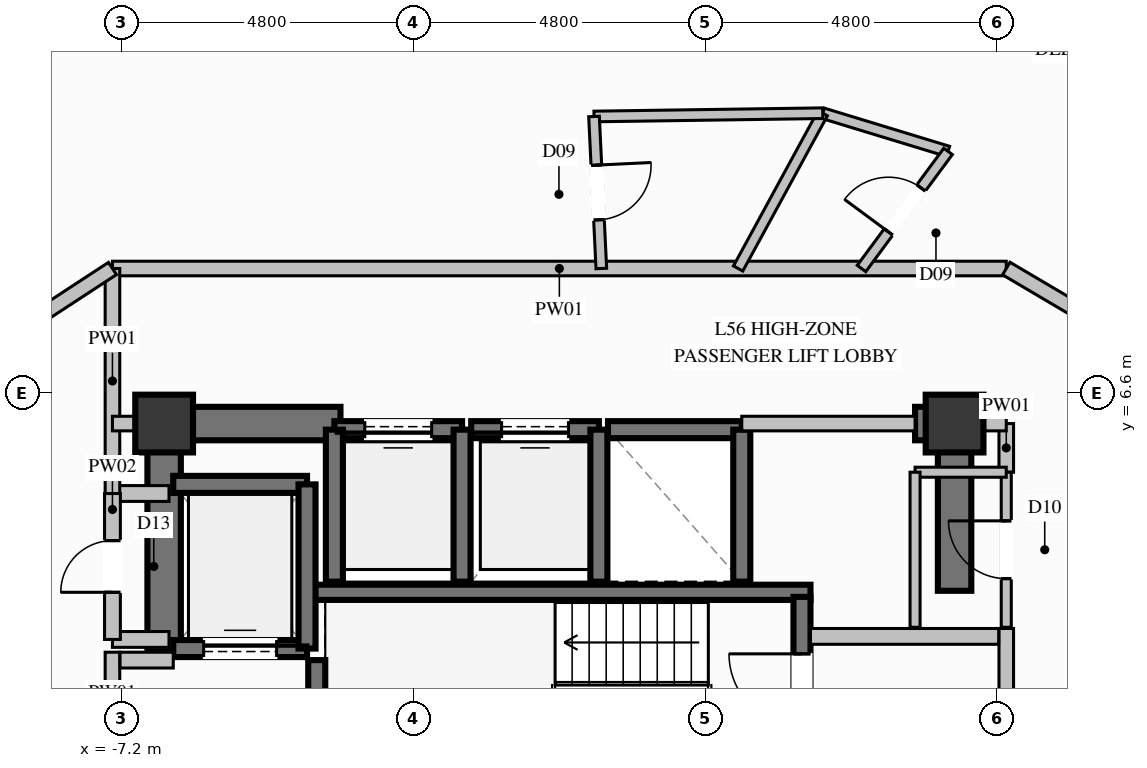
"""IFC4 building model, lengths in metres.
Left out: names, types, materials, properties, quantities, classifications, styles, units other than length and angle.
Written with IfcOpenShell. Run it as: python <this file> out.ifc"""

import sys

from ifc_helpers import new_model, si_unit, direction, frame, frame_2d, origin, origin_2d, place, context, subcontext, project, spatial, rectangle, extrude, element, fill, save


model = new_model("IFC4")
c1 = context("Model", 3, precision=1e-05, world=origin(), true_north=direction((0.0, 1.0)))
c2 = subcontext(c1, "Body", "Model", "MODEL_VIEW")
j1 = project(units=[si_unit("LENGTHUNIT", "METRE"), si_unit("PLANEANGLEUNIT", "RADIAN")], contexts=[c1])
p1 = place(None, origin())
s1 = spatial("IfcSite", under=j1, at=p1, CompositionType="ELEMENT")
p2 = place(p1, origin())
s2 = spatial("IfcBuilding", under=s1, at=p2, CompositionType="ELEMENT")
p3 = place(p2, frame((0.0, 0.0, 216.4)))
s3 = spatial("IfcBuildingStorey", under=s2, at=p3, CompositionType="ELEMENT", Elevation=216.4)
for number, where, z_axis, x_axis in (
    (1, (6.5, 6.1, 0.0), (0.0, 0.0, 1.0), (1.0, 0.0, 0.0)),
    (2, (-6.5, 6.1, 0.0), (0.0, 0.0, 1.0), (1.0, 0.0, 0.0)),
):
    element("IfcColumn", number, at=place(p3, frame(where, z_axis=z_axis, x_axis=x_axis)), inside=s3, PredefinedType="COLUMN", context=c2, shape_type="SweptSolid", body=[
        extrude(rectangle(XDim=0.95, YDim=0.95, at=origin_2d()), origin(), (0.0, 0.0, 1.0), 3.6),
    ])
p4 = place(p3, frame((-4.13, 3.325, 0.0), z_axis=(0.0, 0.0, 1.0), x_axis=(1.0, 0.0, 0.0)))
e3 = element("IfcWall", 3, at=p4, inside=s3, PredefinedType="SOLIDWALL", context=c2, shape_type="SweptSolid", body=[
    extrude(rectangle(XDim=8.26, YDim=0.25, at=frame_2d((4.13, 0.0))), origin(), (0.0, 0.0, 1.0), 3.6),
])
p5 = place(p3, frame((-6.225, 6.1, 0.0), z_axis=(0.0, 0.0, 1.0), x_axis=(1.0, 0.0, 0.0)))
e4 = element("IfcWall", 4, at=p5, inside=s3, PredefinedType="SHEAR", context=c2, shape_type="SweptSolid", body=[
    extrude(rectangle(XDim=2.625, YDim=0.55, at=frame_2d((1.312, 0.0))), origin(), (0.0, 0.0, 1.0), 3.6),
])
p6 = place(p3, frame((5.85, 6.1, 0.0), z_axis=(0.0, 0.0, 1.0), x_axis=(1.0, 0.0, 0.0)))
e5 = element("IfcWall", 5, at=p6, inside=s3, PredefinedType="SHEAR", context=c2, shape_type="SweptSolid", body=[
    extrude(rectangle(XDim=0.375, YDim=0.55, at=frame_2d((0.188, 0.0))), origin(), (0.0, 0.0, 1.0), 3.6),
])
p7 = place(p3, frame((-6.5, 2.35, 0.0), z_axis=(0.0, 0.0, 1.0), x_axis=(0.0, 1.0, 0.0)))
e6 = element("IfcWall", 6, at=p7, inside=s3, PredefinedType="SHEAR", context=c2, shape_type="SweptSolid", body=[
    extrude(rectangle(XDim=4.025, YDim=0.55, at=frame_2d((2.012, 0.0))), origin(), (0.0, 0.0, 1.0), 3.6),
])
p8 = place(p3, frame((6.5, 3.35, 0.0), z_axis=(0.0, 0.0, 1.0), x_axis=(0.0, 1.0, 0.0)))
e7 = element("IfcWall", 7, at=p8, inside=s3, PredefinedType="SHEAR", context=c2, shape_type="SweptSolid", body=[
    extrude(rectangle(XDim=3.025, YDim=0.55, at=frame_2d((1.512, 0.0))), origin(), (0.0, 0.0, 1.0), 3.6),
])
p9 = place(p3, frame((-1.6, 6.0, 0.0), z_axis=(0.0, 0.0, 1.0), x_axis=(-1.0, 0.0, 0.0)))
e8 = element("IfcWall", 8, at=p9, inside=s3, PredefinedType="SOLIDWALL", context=c2, shape_type="SweptSolid", body=[
    extrude(rectangle(XDim=2.1, YDim=0.28, at=frame_2d((1.05, 0.0))), origin(), (0.0, 0.0, 1.0), 3.36),
])
p10 = place(p9, frame((0.5, 0.0, 0.0)))
e9 = element("IfcOpeningElement", 9, at=p10, cuts=e8, PredefinedType="OPENING", context=c2, shape_type="SweptSolid", body=[
    extrude(rectangle(XDim=1.1, YDim=2.2, at=frame_2d((0.55, 1.1))), frame((0.0, 0.15, 0.0), z_axis=(0.0, -1.0, 0.0), x_axis=(1.0, 0.0, 0.0)), (0.0, 0.0, 1.0), 0.3),
])
for number, where, z_axis, x_axis in (
    (10, (-3.7, 6.0, 0.0), (0.0, 0.0, 1.0), (0.0, -1.0, 0.0)),
    (11, (-1.6, 3.5, 0.0), (0.0, 0.0, 1.0), (0.0, 1.0, 0.0)),
):
    element("IfcWall", number, at=place(p3, frame(where, z_axis=z_axis, x_axis=x_axis)), inside=s3, PredefinedType="SOLIDWALL", context=c2, shape_type="SweptSolid", body=[
        extrude(rectangle(XDim=2.5, YDim=0.28, at=frame_2d((1.25, 0.0))), origin(), (0.0, 0.0, 1.0), 3.36),
    ])
p11 = place(p3, frame((0.65, 6.0, 0.0), z_axis=(0.0, 0.0, 1.0), x_axis=(-1.0, 0.0, 0.0)))
e12 = element("IfcWall", 12, at=p11, inside=s3, PredefinedType="SOLIDWALL", context=c2, shape_type="SweptSolid", body=[
    extrude(rectangle(XDim=2.1, YDim=0.28, at=frame_2d((1.05, 0.0))), origin(), (0.0, 0.0, 1.0), 3.36),
])
p12 = place(p11, frame((0.5, 0.0, 0.0)))
e13 = element("IfcOpeningElement", 13, at=p12, cuts=e12, PredefinedType="OPENING", context=c2, shape_type="SweptSolid", body=[
    extrude(rectangle(XDim=1.1, YDim=2.2, at=frame_2d((0.55, 1.1))), frame((0.0, 0.15, 0.0), z_axis=(0.0, -1.0, 0.0), x_axis=(1.0, 0.0, 0.0)), (0.0, 0.0, 1.0), 0.3),
])
p13 = place(p3, frame((0.65, 3.5, 0.0), z_axis=(0.0, 0.0, 1.0), x_axis=(0.0, 1.0, 0.0)))
e14 = element("IfcWall", 14, at=p13, inside=s3, PredefinedType="SOLIDWALL", context=c2, shape_type="SweptSolid", body=[
    extrude(rectangle(XDim=2.5, YDim=0.28, at=frame_2d((1.25, 0.0))), origin(), (0.0, 0.0, 1.0), 3.36),
])
p14 = place(p3, frame((3.0, 6.0, 0.0), z_axis=(0.0, 0.0, 1.0), x_axis=(-1.0, 0.0, 0.0)))
e15 = element("IfcWall", 15, at=p14, inside=s3, PredefinedType="SOLIDWALL", context=c2, shape_type="SweptSolid", body=[
    extrude(rectangle(XDim=2.2, YDim=0.28, at=frame_2d((1.1, 0.0))), origin(), (0.0, 0.0, 1.0), 3.36),
])
p15 = place(p3, frame((3.0, 3.5, 0.0), z_axis=(0.0, 0.0, 1.0), x_axis=(0.0, 1.0, 0.0)))
e16 = element("IfcWall", 16, at=p15, inside=s3, PredefinedType="SOLIDWALL", context=c2, shape_type="SweptSolid", body=[
    extrude(rectangle(XDim=2.5, YDim=0.28, at=frame_2d((1.25, 0.0))), origin(), (0.0, 0.0, 1.0), 3.36),
])
p16 = place(p3, frame((-6.35, 2.4, 0.0), z_axis=(0.0, 0.0, 1.0), x_axis=(1.0, 0.0, 0.0)))
e17 = element("IfcWall", 17, at=p16, inside=s3, PredefinedType="SOLIDWALL", context=c2, shape_type="SweptSolid", body=[
    extrude(rectangle(XDim=2.2, YDim=0.28, at=frame_2d((1.1, 0.0))), origin(), (0.0, 0.0, 1.0), 3.36),
])
p17 = place(p16, frame((0.5, 0.0, 0.0)))
e18 = element("IfcOpeningElement", 18, at=p17, cuts=e17, PredefinedType="OPENING", context=c2, shape_type="SweptSolid", body=[
    extrude(rectangle(XDim=1.2, YDim=2.2, at=frame_2d((0.6, 1.1))), frame((0.0, 0.15, 0.0), z_axis=(0.0, -1.0, 0.0), x_axis=(1.0, 0.0, 0.0)), (0.0, 0.0, 1.0), 0.3),
])
p18 = place(p3, frame((-4.15, 5.1, 0.0), z_axis=(0.0, 0.0, 1.0), x_axis=(-1.0, 0.0, 0.0)))
e19 = element("IfcWall", 19, at=p18, inside=s3, PredefinedType="SOLIDWALL", context=c2, shape_type="SweptSolid", body=[
    extrude(rectangle(XDim=2.2, YDim=0.28, at=frame_2d((1.1, 0.0))), origin(), (0.0, 0.0, 1.0), 3.36),
])
p19 = place(p3, frame((-4.15, 2.4, 0.0), z_axis=(0.0, 0.0, 1.0), x_axis=(0.0, 1.0, 0.0)))
e20 = element("IfcWall", 20, at=p19, inside=s3, PredefinedType="SOLIDWALL", context=c2, shape_type="SweptSolid", body=[
    extrude(rectangle(XDim=2.7, YDim=0.28, at=frame_2d((1.35, 0.0))), origin(), (0.0, 0.0, 1.0), 3.36),
])
p20 = place(p3, frame((-3.99, -3.25, 0.0), z_axis=(0.0, 0.0, 1.0), x_axis=(0.0, 1.0, 0.0)))
e21 = element("IfcWall", 21, at=p20, inside=s3, PredefinedType="SOLIDWALL", context=c2, shape_type="SweptSolid", body=[
    extrude(rectangle(XDim=5.46, YDim=0.28, at=frame_2d((2.73, 0.0))), origin(), (0.0, 0.0, 1.0), 3.36),
])
p21 = place(p20, frame((0.937, 0.0, 0.0)))
e22 = element("IfcOpeningElement", 22, at=p21, cuts=e21, PredefinedType="OPENING", context=c2, shape_type="SweptSolid", body=[
    extrude(rectangle(XDim=1.2, YDim=2.2, at=frame_2d((0.6, 1.1))), frame((0.0, 0.15, 0.0), z_axis=(0.0, -1.0, 0.0), x_axis=(1.0, 0.0, 0.0)), (0.0, 0.0, 1.0), 0.3),
])
p22 = place(p3, frame((3.99, -2.21, 0.0), z_axis=(0.0, 0.0, 1.0), x_axis=(0.0, 1.0, 0.0)))
e23 = element("IfcWall", 23, at=p22, inside=s3, PredefinedType="SOLIDWALL", context=c2, shape_type="SweptSolid", body=[
    extrude(rectangle(XDim=5.46, YDim=0.28, at=frame_2d((2.73, 0.0))), origin(), (0.0, 0.0, 1.0), 3.36),
])
p23 = place(p22, frame((3.323, 0.0, 0.0)))
e24 = element("IfcOpeningElement", 24, at=p23, cuts=e23, PredefinedType="OPENING", context=c2, shape_type="SweptSolid", body=[
    extrude(rectangle(XDim=1.2, YDim=2.2, at=frame_2d((0.6, 1.1))), frame((0.0, 0.15, 0.0), z_axis=(0.0, -1.0, 0.0), x_axis=(1.0, 0.0, 0.0)), (0.0, 0.0, 1.0), 0.3),
])
p24 = place(p3, frame((-7.35, -3.38, 0.0), z_axis=(0.0, 0.0, 1.0), x_axis=(0.0, 1.0, 0.0)))
e25 = element("IfcWall", 25, at=p24, inside=s3, PredefinedType="PARTITIONING", context=c2, shape_type="SweptSolid", body=[
    extrude(rectangle(XDim=5.72, YDim=0.24, at=frame_2d((2.86, 0.0))), origin(), (0.0, 0.0, 1.0), 2.445),
])
p25 = place(p24, frame((1.599, 0.0, 0.0)))
e26 = element("IfcOpeningElement", 26, at=p25, cuts=e25, PredefinedType="OPENING", context=c2, shape_type="SweptSolid", body=[
    extrude(rectangle(XDim=1.15, YDim=2.2, at=frame_2d((0.575, 1.1))), frame((0.0, 0.13, 0.0), z_axis=(0.0, -1.0, 0.0), x_axis=(1.0, 0.0, 0.0)), (0.0, 0.0, 1.0), 0.26),
])
p26 = place(p3, frame((-7.225, 2.21, 0.0), z_axis=(0.0, 0.0, 1.0), x_axis=(1.0, 0.0, 0.0)))
e27 = element("IfcWall", 27, at=p26, inside=s3, PredefinedType="PARTITIONING", context=c2, shape_type="SweptSolid", body=[
    extrude(rectangle(XDim=0.875, YDim=0.26, at=frame_2d((0.438, 0.0))), origin(), (0.0, 0.0, 1.0), 3.36),
])
p27 = place(p3, frame((7.35, -2.34, 0.0), z_axis=(0.0, 0.0, 1.0), x_axis=(0.0, 1.0, 0.0)))
e28 = element("IfcWall", 28, at=p27, inside=s3, PredefinedType="PARTITIONING", context=c2, shape_type="SweptSolid", body=[
    extrude(rectangle(XDim=5.07, YDim=0.24, at=frame_2d((2.535, 0.0))), origin(), (0.0, 0.0, 1.0), 2.445),
])
p28 = place(p27, frame((2.548, 0.0, 0.0)))
e29 = element("IfcOpeningElement", 29, at=p28, cuts=e28, PredefinedType="OPENING", context=c2, shape_type="SweptSolid", body=[
    extrude(rectangle(XDim=1.15, YDim=2.2, at=frame_2d((0.575, 1.1))), frame((0.0, 0.13, 0.0), z_axis=(0.0, -1.0, 0.0), x_axis=(1.0, 0.0, 0.0)), (0.0, 0.0, 1.0), 0.26),
])
p29 = place(p3, frame((4.13, 2.6, 0.0), z_axis=(0.0, 0.0, 1.0), x_axis=(1.0, 0.0, 0.0)))
e30 = element("IfcWall", 30, at=p29, inside=s3, PredefinedType="PARTITIONING", context=c2, shape_type="SweptSolid", body=[
    extrude(rectangle(XDim=3.095, YDim=0.26, at=frame_2d((1.548, 0.0))), origin(), (0.0, 0.0, 1.0), 3.36),
])
for number, where, z_axis, x_axis in (
    (31, (-7.35, 4.95, 0.0), (0.0, 0.0, 1.0), (1.0, 0.0, 0.0)),
    (32, (-7.35, 2.55, 0.0), (0.0, 0.0, 1.0), (1.0, 0.0, 0.0)),
):
    element("IfcWall", number, at=place(p3, frame(where, z_axis=z_axis, x_axis=x_axis)), inside=s3, PredefinedType="PARTITIONING", context=c2, shape_type="SweptSolid", body=[
        extrude(rectangle(XDim=0.93, YDim=0.26, at=frame_2d((0.465, 0.0))), origin(), (0.0, 0.0, 1.0), 3.36),
    ])
p30 = place(p3, frame((-7.35, 2.55, 0.0), z_axis=(0.0, 0.0, 1.0), x_axis=(0.0, 1.0, 0.0)))
e33 = element("IfcWall", 33, at=p30, inside=s3, PredefinedType="PARTITIONING", context=c2, shape_type="SweptSolid", body=[
    extrude(rectangle(XDim=2.4, YDim=0.26, at=frame_2d((1.2, 0.0))), origin(), (0.0, 0.0, 1.0), 2.445),
])
p31 = place(p30, frame((0.775, 0.0, 0.0)))
e34 = element("IfcOpeningElement", 34, at=p31, cuts=e33, PredefinedType="OPENING", context=c2, shape_type="SweptSolid", body=[
    extrude(rectangle(XDim=0.85, YDim=2.05, at=frame_2d((0.425, 1.025))), frame((0.0, 0.14, 0.0), z_axis=(0.0, -1.0, 0.0), x_axis=(1.0, 0.0, 0.0)), (0.0, 0.0, 1.0), 0.28),
])
p32 = place(p3, frame((-7.35, 8.65, 0.0), z_axis=(0.0, 0.0, 1.0), x_axis=(1.0, 0.0, 0.0)))
e35 = element("IfcWall", 35, at=p32, inside=s3, PredefinedType="PARTITIONING", context=c2, shape_type="SweptSolid", body=[
    extrude(rectangle(XDim=14.7, YDim=0.24, at=frame_2d((7.35, 0.0))), origin(), (0.0, 0.0, 1.0), 3.36),
])
p33 = place(p3, frame((3.0, 6.1, 0.0), z_axis=(0.0, 0.0, 1.0), x_axis=(1.0, 0.0, 0.0)))
e36 = element("IfcWall", 36, at=p33, inside=s3, PredefinedType="PARTITIONING", context=c2, shape_type="SweptSolid", body=[
    extrude(rectangle(XDim=2.85, YDim=0.24, at=frame_2d((1.425, 0.0))), origin(), (0.0, 0.0, 1.0), 2.445),
])
p34 = place(p3, frame((7.35, 5.3, 0.0), z_axis=(0.0, 0.0, 1.0), x_axis=(0.0, 1.0, 0.0)))
e37 = element("IfcWall", 37, at=p34, inside=s3, PredefinedType="PARTITIONING", context=c2, shape_type="SweptSolid", body=[
    extrude(rectangle(XDim=0.8, YDim=0.24, at=frame_2d((0.4, 0.0))), origin(), (0.0, 0.0, 1.0), 2.445),
])
p35 = place(p3, frame((6.5, 6.1, 0.0), z_axis=(0.0, 0.0, 1.0), x_axis=(1.0, 0.0, 0.0)))
e38 = element("IfcWall", 38, at=p35, inside=s3, PredefinedType="PARTITIONING", context=c2, shape_type="SweptSolid", body=[
    extrude(rectangle(XDim=0.85, YDim=0.24, at=frame_2d((0.425, 0.0))), origin(), (0.0, 0.0, 1.0), 2.801),
])
p36 = place(p3, frame((-7.35, 4.95, 0.0), z_axis=(0.0, 0.0, 1.0), x_axis=(0.0, 1.0, 0.0)))
e39 = element("IfcWall", 39, at=p36, inside=s3, PredefinedType="PARTITIONING", context=c2, shape_type="SweptSolid", body=[
    extrude(rectangle(XDim=3.7, YDim=0.24, at=frame_2d((1.85, 0.0))), origin(), (0.0, 0.0, 1.0), 2.445),
])
p37 = place(p3, frame((-7.35, 6.1, 0.0), z_axis=(0.0, 0.0, 1.0), x_axis=(1.0, 0.0, 0.0)))
e40 = element("IfcWall", 40, at=p37, inside=s3, PredefinedType="PARTITIONING", context=c2, shape_type="SweptSolid", body=[
    extrude(rectangle(XDim=0.85, YDim=0.24, at=frame_2d((0.425, 0.0))), origin(), (0.0, 0.0, 1.0), 2.801),
])
p38 = place(p3, frame((7.35, 2.75, 0.0), z_axis=(0.0, 0.0, 1.0), x_axis=(0.0, 1.0, 0.0)))
e41 = element("IfcWall", 41, at=p38, inside=s3, PredefinedType="PARTITIONING", context=c2, shape_type="SweptSolid", body=[
    extrude(rectangle(XDim=2.55, YDim=0.165, at=frame_2d((1.275, 0.0))), origin(), (0.0, 0.0, 1.0), 3.36),
])
p39 = place(p38, frame((0.8, 0.0, 0.0)))
e42 = element("IfcOpeningElement", 42, at=p39, cuts=e41, PredefinedType="OPENING", context=c2, shape_type="SweptSolid", body=[
    extrude(rectangle(XDim=0.95, YDim=2.1, at=frame_2d((0.475, 1.05))), frame((0.0, 0.093, 0.0), z_axis=(0.0, -1.0, 0.0), x_axis=(1.0, 0.0, 0.0)), (0.0, 0.0, 1.0), 0.185),
])
p40 = place(p3, frame((7.35, 5.3, 0.0), z_axis=(0.0, 0.0, 1.0), x_axis=(-1.0, 0.0, 0.0)))
e43 = element("IfcWall", 43, at=p40, inside=s3, PredefinedType="PARTITIONING", context=c2, shape_type="SweptSolid", body=[
    extrude(rectangle(XDim=1.5, YDim=0.165, at=frame_2d((0.75, 0.0))), origin(), (0.0, 0.0, 1.0), 2.445),
])
p41 = place(p3, frame((5.85, 5.3, 0.0), z_axis=(0.0, 0.0, 1.0), x_axis=(0.0, -1.0, 0.0)))
e44 = element("IfcWall", 44, at=p41, inside=s3, PredefinedType="PARTITIONING", context=c2, shape_type="SweptSolid", body=[
    extrude(rectangle(XDim=2.55, YDim=0.165, at=frame_2d((1.275, 0.0))), origin(), (0.0, 0.0, 1.0), 2.445),
])
p42 = place(p3, frame((4.332, 11.204, 0.0), z_axis=(0.0, 0.0, 1.0), x_axis=(0.956557161729, -0.291544844483, 0.0)))
e45 = element("IfcWall", 45, at=p42, inside=s3, PredefinedType="PLUMBINGWALL", context=c2, shape_type="SweptSolid", body=[
    extrude(rectangle(XDim=2.155, YDim=0.175, at=frame_2d((1.077, 0.0))), origin(), (0.0, 0.0, 1.0), 3.36),
])
p43 = place(p3, frame((4.332, 11.204, 0.0), z_axis=(0.0, 0.0, 1.0), x_axis=(-0.47855808815, -0.878055895866, 0.0)))
e46 = element("IfcWall", 46, at=p43, inside=s3, PredefinedType="PLUMBINGWALL", context=c2, shape_type="SweptSolid", body=[
    extrude(rectangle(XDim=2.909, YDim=0.175, at=frame_2d((1.455, 0.0))), origin(), (0.0, 0.0, 1.0), 3.36),
])
p44 = place(p3, frame((4.969, 8.65, 0.0), z_axis=(0.0, 0.0, 1.0), x_axis=(0.594522881491, 0.804078692283, 0.0)))
e47 = element("IfcWall", 47, at=p44, inside=s3, PredefinedType="PLUMBINGWALL", context=c2, shape_type="SweptSolid", body=[
    extrude(rectangle(XDim=2.395, YDim=0.175, at=frame_2d((1.198, 0.0))), origin(), (0.0, 0.0, 1.0), 3.36),
])
p45 = place(p44, frame((0.748, 0.0, 0.0)))
e48 = element("IfcOpeningElement", 48, at=p45, cuts=e47, PredefinedType="OPENING", context=c2, shape_type="SweptSolid", body=[
    extrude(rectangle(XDim=0.9, YDim=2.1, at=frame_2d((0.45, 1.05))), frame((0.0, 0.098, 0.0), z_axis=(0.0, -1.0, 0.0), x_axis=(1.0, 0.0, 0.0)), (0.0, 0.0, 1.0), 0.195),
])
p46 = place(p3, frame((7.35, 8.65, 0.0), z_axis=(0.0, 0.0, 1.0), x_axis=(0.861164858472, -0.508325768118, 0.0)))
e49 = element("IfcWall", 49, at=p46, inside=s3, PredefinedType="PARTITIONING", context=c2, shape_type="SweptSolid", body=[
    extrude(rectangle(XDim=4.77, YDim=0.24, at=frame_2d((2.385, 0.0))), origin(), (0.0, 0.0, 1.0), 3.36),
])
p47 = place(p46, frame((1.885, 0.0, 0.0)))
e50 = element("IfcOpeningElement", 50, at=p47, cuts=e49, PredefinedType="OPENING", context=c2, shape_type="SweptSolid", body=[
    extrude(rectangle(XDim=1.0, YDim=2.2, at=frame_2d((0.5, 1.1))), frame((0.0, 0.13, 0.0), z_axis=(0.0, -1.0, 0.0), x_axis=(1.0, 0.0, 0.0)), (0.0, 0.0, 1.0), 0.26),
])
p48 = place(p3, frame((0.57, 11.15, 0.0), z_axis=(0.0, 0.0, 1.0), x_axis=(0.999896232957, 0.014405669655, 0.0)))
e51 = element("IfcWall", 51, at=p48, inside=s3, PredefinedType="PLUMBINGWALL", context=c2, shape_type="SweptSolid", body=[
    extrude(rectangle(XDim=3.762, YDim=0.175, at=frame_2d((1.881, 0.0))), origin(), (0.0, 0.0, 1.0), 3.36),
])
p49 = place(p3, frame((0.57, 11.15, 0.0), z_axis=(0.0, 0.0, 1.0), x_axis=(0.04789419293, -0.998852414666, 0.0)))
e52 = element("IfcWall", 52, at=p49, inside=s3, PredefinedType="PLUMBINGWALL", context=c2, shape_type="SweptSolid", body=[
    extrude(rectangle(XDim=2.503, YDim=0.175, at=frame_2d((1.251, 0.0))), origin(), (0.0, 0.0, 1.0), 3.36),
])
p50 = place(p49, frame((0.801, 0.0, 0.0)))
e53 = element("IfcOpeningElement", 53, at=p50, cuts=e52, PredefinedType="OPENING", context=c2, shape_type="SweptSolid", body=[
    extrude(rectangle(XDim=0.9, YDim=2.1, at=frame_2d((0.45, 1.05))), frame((0.0, 0.098, 0.0), z_axis=(0.0, -1.0, 0.0), x_axis=(1.0, 0.0, 0.0)), (0.0, 0.0, 1.0), 0.195),
])
p51 = place(p3, frame((-11.058, 6.225, 0.0), z_axis=(0.0, 0.0, 1.0), x_axis=(0.83693466485, 0.547302810857, 0.0)))
e54 = element("IfcWall", 54, at=p51, inside=s3, PredefinedType="PARTITIONING", context=c2, shape_type="SweptSolid", body=[
    extrude(rectangle(XDim=4.43, YDim=0.24, at=frame_2d((2.215, 0.0))), origin(), (0.0, 0.0, 1.0), 3.36),
])
p52 = place(p51, frame((1.715, 0.0, 0.0)))
e55 = element("IfcOpeningElement", 55, at=p52, cuts=e54, PredefinedType="OPENING", context=c2, shape_type="SweptSolid", body=[
    extrude(rectangle(XDim=1.0, YDim=2.2, at=frame_2d((0.5, 1.1))), frame((0.0, 0.13, 0.0), z_axis=(0.0, -1.0, 0.0), x_axis=(1.0, 0.0, 0.0)), (0.0, 0.0, 1.0), 0.26),
])
p53 = place(p10, origin())
e56 = element("IfcDoor", 56, at=p53, inside=s3, OperationType="SLIDING_TO_LEFT", PredefinedType="DOOR", context=c2, shape_type="SweptSolid", body=[
    extrude(rectangle(XDim=1.1, YDim=2.2, at=frame_2d((0.55, 1.1))), frame((0.0, 0.025, 0.0), z_axis=(0.0, -1.0, 0.0), x_axis=(1.0, 0.0, 0.0)), (0.0, 0.0, 1.0), 0.05),
])
fill(e9, e56)
p54 = place(p12, origin())
e57 = element("IfcDoor", 57, at=p54, inside=s3, OperationType="SLIDING_TO_LEFT", PredefinedType="DOOR", context=c2, shape_type="SweptSolid", body=[
    extrude(rectangle(XDim=1.1, YDim=2.2, at=frame_2d((0.55, 1.1))), frame((0.0, 0.025, 0.0), z_axis=(0.0, -1.0, 0.0), x_axis=(1.0, 0.0, 0.0)), (0.0, 0.0, 1.0), 0.05),
])
fill(e13, e57)
p55 = place(p17, origin())
e58 = element("IfcDoor", 58, at=p55, inside=s3, OperationType="SLIDING_TO_LEFT", PredefinedType="DOOR", context=c2, shape_type="SweptSolid", body=[
    extrude(rectangle(XDim=1.2, YDim=2.2, at=frame_2d((0.6, 1.1))), frame((0.0, 0.025, 0.0), z_axis=(0.0, -1.0, 0.0), x_axis=(1.0, 0.0, 0.0)), (0.0, 0.0, 1.0), 0.05),
])
fill(e18, e58)
p56 = place(p23, origin())
e59 = element("IfcDoor", 59, at=p56, inside=s3, OperationType="SINGLE_SWING_RIGHT", PredefinedType="DOOR", context=c2, shape_type="SweptSolid", body=[
    extrude(rectangle(XDim=1.2, YDim=2.2, at=frame_2d((0.6, 1.1))), frame((0.0, 0.025, 0.0), z_axis=(0.0, -1.0, 0.0), x_axis=(1.0, 0.0, 0.0)), (0.0, 0.0, 1.0), 0.05),
])
fill(e24, e59)
p57 = place(p31, origin())
e60 = element("IfcDoor", 60, at=p57, inside=s3, OperationType="SINGLE_SWING_LEFT", PredefinedType="DOOR", context=c2, shape_type="SweptSolid", body=[
    extrude(rectangle(XDim=0.85, YDim=2.05, at=frame_2d((0.425, 1.025))), frame((0.0, 0.025, 0.0), z_axis=(0.0, -1.0, 0.0), x_axis=(1.0, 0.0, 0.0)), (0.0, 0.0, 1.0), 0.05),
])
fill(e34, e60)
p58 = place(p39, origin())
e61 = element("IfcDoor", 61, at=p58, inside=s3, OperationType="SINGLE_SWING_RIGHT", PredefinedType="DOOR", context=c2, shape_type="SweptSolid", body=[
    extrude(rectangle(XDim=0.95, YDim=2.1, at=frame_2d((0.475, 1.05))), frame((0.0, 0.025, 0.0), z_axis=(0.0, -1.0, 0.0), x_axis=(1.0, 0.0, 0.0)), (0.0, 0.0, 1.0), 0.05),
])
fill(e42, e61)
p59 = place(p45, origin())
e62 = element("IfcDoor", 62, at=p59, inside=s3, OperationType="SINGLE_SWING_LEFT", PredefinedType="DOOR", context=c2, shape_type="SweptSolid", body=[
    extrude(rectangle(XDim=0.9, YDim=2.1, at=frame_2d((0.45, 1.05))), frame((0.0, 0.025, 0.0), z_axis=(0.0, -1.0, 0.0), x_axis=(1.0, 0.0, 0.0)), (0.0, 0.0, 1.0), 0.05),
])
fill(e48, e62)
p60 = place(p50, origin())
e63 = element("IfcDoor", 63, at=p60, inside=s3, OperationType="SINGLE_SWING_LEFT", PredefinedType="DOOR", context=c2, shape_type="SweptSolid", body=[
    extrude(rectangle(XDim=0.9, YDim=2.1, at=frame_2d((0.45, 1.05))), frame((0.0, 0.025, 0.0), z_axis=(0.0, -1.0, 0.0), x_axis=(1.0, 0.0, 0.0)), (0.0, 0.0, 1.0), 0.05),
])
fill(e53, e63)
save(model, sys.argv[1])
